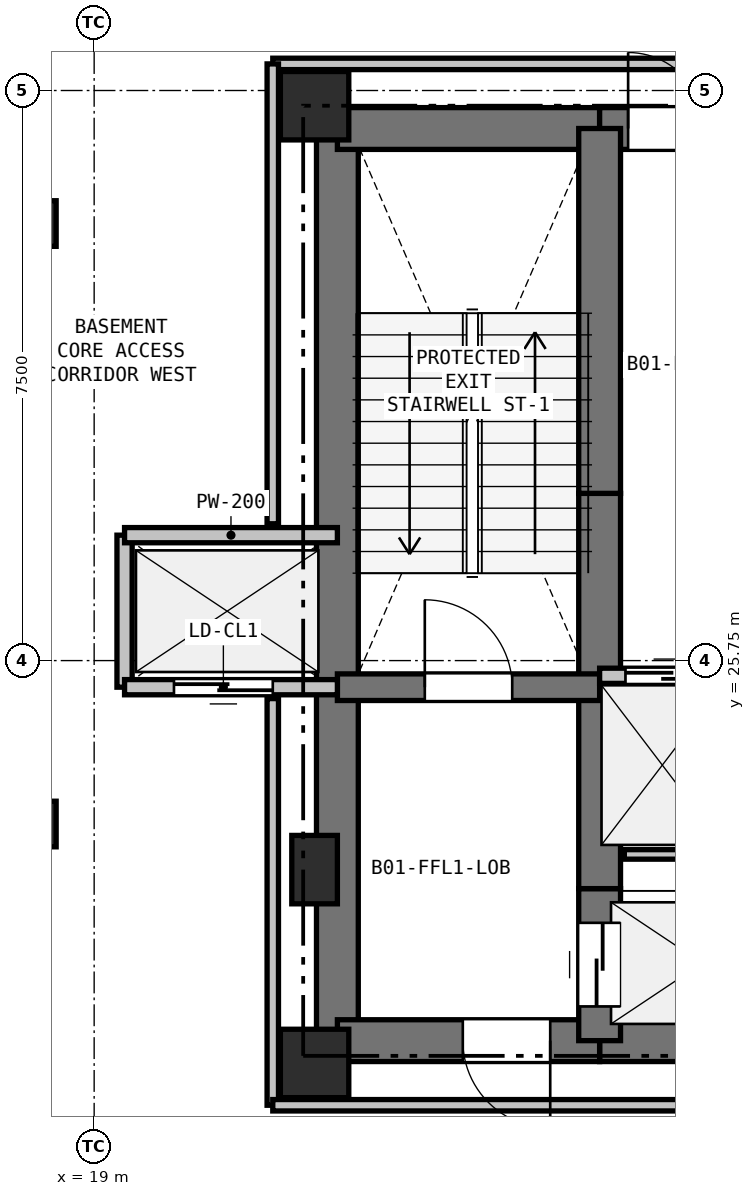
"""IFC4 building model, lengths in metres.
Left out: names, types, materials, properties, quantities, classifications, styles, units other than length and angle.
Written with IfcOpenShell. Run it as: python <this file> out.ifc"""

import sys

from ifc_helpers import new_model, si_unit, direction, frame, frame_2d, origin, origin_2d, place, context, subcontext, project, spatial, rectangle, extrude, element, fill, save


model = new_model("IFC4")
c1 = context("Model", 3, precision=1e-05, world=origin(), true_north=direction((0.0, 1.0)))
c2 = subcontext(c1, "Body", "Model", "MODEL_VIEW")
j1 = project(units=[si_unit("LENGTHUNIT", "METRE"), si_unit("PLANEANGLEUNIT", "RADIAN")], contexts=[c1])
p1 = place(None, origin())
s1 = spatial("IfcSite", under=j1, at=p1, CompositionType="ELEMENT")
p2 = place(p1, origin())
s2 = spatial("IfcBuilding", under=s1, at=p2, CompositionType="ELEMENT")
p3 = place(p2, frame((0.0, 0.0, -4.5)))
s3 = spatial("IfcBuildingStorey", under=s2, at=p3, CompositionType="ELEMENT", Elevation=-4.5)
for number, where, z_axis, x_axis in (
    (1, (18.2, 23.6, 0.0), (0.0, 0.0, 1.0), (1.0, 0.0, 0.0)),
    (2, (18.2, 31.5, 0.0), (0.0, 0.0, 1.0), (1.0, 0.0, 0.0)),
):
    element("IfcColumn", number, at=place(p3, frame(where, z_axis=z_axis, x_axis=x_axis)), inside=s3, PredefinedType="COLUMN", context=c2, shape_type="SweptSolid", body=[
        extrude(rectangle(XDim=0.6, YDim=0.6, at=origin_2d()), origin(), (0.0, 0.0, 1.0), 4.5),
    ])
for number, where, z_axis, x_axis in (
    (3, (21.9, 20.45, 0.0), (0.0, 0.0, 1.0), (1.0, 0.0, 0.0)),
    (4, (21.9, 33.05, 0.0), (0.0, 0.0, 1.0), (1.0, 0.0, 0.0)),
):
    element("IfcColumn", number, at=place(p3, frame(where, z_axis=z_axis, x_axis=x_axis)), inside=s3, PredefinedType="COLUMN", context=c2, shape_type="SweptSolid", body=[
        extrude(rectangle(XDim=0.9, YDim=0.9, at=origin_2d()), origin(), (0.0, 0.0, 1.0), 4.5),
    ])
p4 = place(p3, frame((21.9, 23.0, 0.0), z_axis=(0.0, 0.0, 1.0), x_axis=(1.0, 0.0, 0.0)))
e5 = element("IfcColumn", 5, at=p4, inside=s3, PredefinedType="PILASTER", context=c2, shape_type="SweptSolid", body=[
    extrude(rectangle(XDim=0.6, YDim=0.9, at=origin_2d()), origin(), (0.0, 0.0, 1.0), 4.5),
])
p5 = place(p3, frame((22.2, 20.75, 0.0), z_axis=(0.0, 0.0, 1.0), x_axis=(0.0, 1.0, 0.0)))
e6 = element("IfcWall", 6, at=p5, inside=s3, PredefinedType="SHEAR", context=c2, shape_type="SweptSolid", body=[
    extrude(rectangle(XDim=4.65, YDim=0.55, at=frame_2d((2.325, 0.0))), origin(), (0.0, 0.0, 1.0), 4.2),
])
p6 = place(p3, frame((22.2, 25.4, 0.0), z_axis=(0.0, 0.0, 1.0), x_axis=(0.0, 1.0, 0.0)))
e7 = element("IfcWall", 7, at=p6, inside=s3, PredefinedType="SHEAR", context=c2, shape_type="SweptSolid", body=[
    extrude(rectangle(XDim=7.35, YDim=0.55, at=frame_2d((3.675, 0.0))), origin(), (0.0, 0.0, 1.0), 4.2),
])
p7 = place(p3, frame((22.2, 32.75, 0.0), z_axis=(0.0, 0.0, 1.0), x_axis=(1.0, 0.0, 0.0)))
e8 = element("IfcWall", 8, at=p7, inside=s3, PredefinedType="SHEAR", context=c2, shape_type="SweptSolid", body=[
    extrude(rectangle(XDim=3.45, YDim=0.55, at=frame_2d((1.725, 0.0))), origin(), (0.0, 0.0, 1.0), 4.2),
])
p8 = place(p3, frame((25.65, 32.75, 0.0), z_axis=(0.0, 0.0, 1.0), x_axis=(1.0, 0.0, 0.0)))
e9 = element("IfcWall", 9, at=p8, inside=s3, PredefinedType="SHEAR", context=c2, shape_type="SweptSolid", body=[
    extrude(rectangle(XDim=1.75, YDim=0.55, at=frame_2d((0.875, 0.0))), origin(), (0.0, 0.0, 1.0), 4.2),
])
p9 = place(p8, frame((0.375, 0.0, 0.0)))
e10 = element("IfcOpeningElement", 10, at=p9, cuts=e9, PredefinedType="OPENING", context=c2, shape_type="SweptSolid", body=[
    extrude(rectangle(XDim=1.0, YDim=2.15, at=frame_2d((0.5, 1.075))), frame((0.0, 0.285, 0.0), z_axis=(0.0, -1.0, 0.0), x_axis=(1.0, 0.0, 0.0)), (0.0, 0.0, 1.0), 0.57),
])
p10 = place(p3, frame((28.35, 20.75, 0.0), z_axis=(0.0, 0.0, 1.0), x_axis=(-1.0, 0.0, 0.0)))
e11 = element("IfcWall", 11, at=p10, inside=s3, PredefinedType="SHEAR", context=c2, shape_type="SweptSolid", body=[
    extrude(rectangle(XDim=2.7, YDim=0.55, at=frame_2d((1.35, 0.0))), origin(), (0.0, 0.0, 1.0), 4.2),
])
p11 = place(p3, frame((25.65, 20.75, 0.0), z_axis=(0.0, 0.0, 1.0), x_axis=(-1.0, 0.0, 0.0)))
e12 = element("IfcWall", 12, at=p11, inside=s3, PredefinedType="SHEAR", context=c2, shape_type="SweptSolid", body=[
    extrude(rectangle(XDim=3.45, YDim=0.55, at=frame_2d((1.725, 0.0))), origin(), (0.0, 0.0, 1.0), 4.2),
])
p12 = place(p11, frame((0.65, 0.0, 0.0)))
e13 = element("IfcOpeningElement", 13, at=p12, cuts=e12, PredefinedType="OPENING", context=c2, shape_type="SweptSolid", body=[
    extrude(rectangle(XDim=1.15, YDim=2.15, at=frame_2d((0.575, 1.075))), frame((0.0, 0.285, 0.0), z_axis=(0.0, -1.0, 0.0), x_axis=(1.0, 0.0, 0.0)), (0.0, 0.0, 1.0), 0.57),
])
p13 = place(p3, frame((25.65, 20.75, 0.0), z_axis=(0.0, 0.0, 1.0), x_axis=(0.0, 1.0, 0.0)))
e14 = element("IfcWall", 14, at=p13, inside=s3, PredefinedType="SHEAR", context=c2, shape_type="SweptSolid", body=[
    extrude(rectangle(XDim=2.0, YDim=0.55, at=frame_2d((1.0, 0.0))), origin(), (0.0, 0.0, 1.0), 4.2),
])
p14 = place(p13, frame((0.45, 0.0, 0.0)))
e15 = element("IfcOpeningElement", 15, at=p14, cuts=e14, PredefinedType="OPENING", context=c2, shape_type="SweptSolid", body=[
    extrude(rectangle(XDim=1.1, YDim=2.15, at=frame_2d((0.55, 1.075))), frame((0.0, 0.285, 0.0), z_axis=(0.0, -1.0, 0.0), x_axis=(1.0, 0.0, 0.0)), (0.0, 0.0, 1.0), 0.57),
])
p15 = place(p3, frame((25.65, 22.75, 0.0), z_axis=(0.0, 0.0, 1.0), x_axis=(0.0, 1.0, 0.0)))
e16 = element("IfcWall", 16, at=p15, inside=s3, PredefinedType="SHEAR", context=c2, shape_type="SweptSolid", body=[
    extrude(rectangle(XDim=2.8, YDim=0.55, at=frame_2d((1.4, 0.0))), origin(), (0.0, 0.0, 1.0), 4.2),
])
p16 = place(p3, frame((25.65, 25.55, 0.0), z_axis=(0.0, 0.0, 1.0), x_axis=(0.0, 1.0, 0.0)))
e17 = element("IfcWall", 17, at=p16, inside=s3, PredefinedType="SHEAR", context=c2, shape_type="SweptSolid", body=[
    extrude(rectangle(XDim=2.4, YDim=0.55, at=frame_2d((1.2, 0.0))), origin(), (0.0, 0.0, 1.0), 4.2),
])
p17 = place(p3, frame((25.65, 27.95, 0.0), z_axis=(0.0, 0.0, 1.0), x_axis=(0.0, 1.0, 0.0)))
e18 = element("IfcWall", 18, at=p17, inside=s3, PredefinedType="SHEAR", context=c2, shape_type="SweptSolid", body=[
    extrude(rectangle(XDim=4.8, YDim=0.55, at=frame_2d((2.4, 0.0))), origin(), (0.0, 0.0, 1.0), 4.2),
])
p18 = place(p3, frame((22.2, 25.4, 0.0), z_axis=(0.0, 0.0, 1.0), x_axis=(1.0, 0.0, 0.0)))
e19 = element("IfcWall", 19, at=p18, inside=s3, PredefinedType="SHEAR", context=c2, shape_type="SweptSolid", body=[
    extrude(rectangle(XDim=3.45, YDim=0.35, at=frame_2d((1.725, 0.0))), origin(), (0.0, 0.0, 1.0), 4.2),
])
p19 = place(p18, frame((1.15, 0.0, 0.0)))
e20 = element("IfcOpeningElement", 20, at=p19, cuts=e19, PredefinedType="OPENING", context=c2, shape_type="SweptSolid", body=[
    extrude(rectangle(XDim=1.15, YDim=2.15, at=frame_2d((0.575, 1.075))), frame((0.0, 0.185, 0.0), z_axis=(0.0, -1.0, 0.0), x_axis=(1.0, 0.0, 0.0)), (0.0, 0.0, 1.0), 0.37),
])
p20 = place(p3, frame((25.65, 25.55, 0.0), z_axis=(0.0, 0.0, 1.0), x_axis=(1.0, 0.0, 0.0)))
e21 = element("IfcWall", 21, at=p20, inside=s3, PredefinedType="PARTITIONING", context=c2, shape_type="SweptSolid", body=[
    extrude(rectangle(XDim=4.95, YDim=0.2, at=frame_2d((2.475, 0.0))), origin(), (0.0, 0.0, 1.0), 4.2),
])
p21 = place(p20, frame((0.34, 0.0, 0.0)))
e22 = element("IfcOpeningElement", 22, at=p21, cuts=e21, PredefinedType="OPENING", context=c2, shape_type="SweptSolid", body=[
    extrude(rectangle(XDim=1.1, YDim=2.15, at=frame_2d((0.55, 1.075))), frame((0.0, 0.11, 0.0), z_axis=(0.0, -1.0, 0.0), x_axis=(1.0, 0.0, 0.0)), (0.0, 0.0, 1.0), 0.22),
])
p22 = place(p20, frame((1.99, 0.0, 0.0)))
e23 = element("IfcOpeningElement", 23, at=p22, cuts=e21, PredefinedType="OPENING", context=c2, shape_type="SweptSolid", body=[
    extrude(rectangle(XDim=1.1, YDim=2.15, at=frame_2d((0.55, 1.075))), frame((0.0, 0.11, 0.0), z_axis=(0.0, -1.0, 0.0), x_axis=(1.0, 0.0, 0.0)), (0.0, 0.0, 1.0), 0.22),
])
p23 = place(p20, frame((3.64, 0.0, 0.0)))
e24 = element("IfcOpeningElement", 24, at=p23, cuts=e21, PredefinedType="OPENING", context=c2, shape_type="SweptSolid", body=[
    extrude(rectangle(XDim=1.1, YDim=2.15, at=frame_2d((0.55, 1.075))), frame((0.0, 0.11, 0.0), z_axis=(0.0, -1.0, 0.0), x_axis=(1.0, 0.0, 0.0)), (0.0, 0.0, 1.0), 0.22),
])
p24 = place(p3, frame((19.4, 25.4, 0.0), z_axis=(0.0, 0.0, 1.0), x_axis=(0.0, 1.0, 0.0)))
e25 = element("IfcWall", 25, at=p24, inside=s3, PredefinedType="PARTITIONING", context=c2, shape_type="SweptSolid", body=[
    extrude(rectangle(XDim=2.0, YDim=0.2, at=frame_2d((1.0, 0.0))), origin(), (0.0, 0.0, 1.0), 4.2),
])
p25 = place(p3, frame((19.4, 27.4, 0.0), z_axis=(0.0, 0.0, 1.0), x_axis=(1.0, 0.0, 0.0)))
e26 = element("IfcWall", 26, at=p25, inside=s3, PredefinedType="PARTITIONING", context=c2, shape_type="SweptSolid", body=[
    extrude(rectangle(XDim=2.8, YDim=0.2, at=frame_2d((1.4, 0.0))), origin(), (0.0, 0.0, 1.0), 4.2),
])
p26 = place(p3, frame((22.2, 25.4, 0.0), z_axis=(0.0, 0.0, 1.0), x_axis=(-1.0, 0.0, 0.0)))
e27 = element("IfcWall", 27, at=p26, inside=s3, PredefinedType="PARTITIONING", context=c2, shape_type="SweptSolid", body=[
    extrude(rectangle(XDim=2.8, YDim=0.2, at=frame_2d((1.4, 0.0))), origin(), (0.0, 0.0, 1.0), 4.2),
])
p27 = place(p26, frame((0.85, 0.0, 0.0)))
e28 = element("IfcOpeningElement", 28, at=p27, cuts=e27, PredefinedType="OPENING", context=c2, shape_type="SweptSolid", body=[
    extrude(rectangle(XDim=1.3, YDim=2.2, at=frame_2d((0.65, 1.1))), frame((0.0, 0.11, 0.0), z_axis=(0.0, -1.0, 0.0), x_axis=(1.0, 0.0, 0.0)), (0.0, 0.0, 1.0), 0.22),
])
p28 = place(p3, frame((25.975, 23.2, 0.0), z_axis=(0.0, 0.0, 1.0), x_axis=(1.0, 0.0, 0.0)))
e29 = element("IfcWall", 29, at=p28, inside=s3, PredefinedType="PARTITIONING", context=c2, shape_type="SweptSolid", body=[
    extrude(rectangle(XDim=1.325, YDim=0.125, at=frame_2d((0.663, 0.0))), origin(), (0.0, 0.0, 1.0), 4.2),
])
p29 = place(p3, frame((36.65, 33.6, 0.0), z_axis=(0.0, 0.0, 1.0), x_axis=(-1.0, 0.0, 0.0)))
e30 = element("IfcWall", 30, at=p29, inside=s3, PredefinedType="PARTITIONING", context=c2, shape_type="SweptSolid", body=[
    extrude(rectangle(XDim=15.3, YDim=0.15, at=frame_2d((7.65, 0.0))), origin(), (0.0, 0.0, 1.0), 4.2),
])
p30 = place(p3, frame((21.35, 33.6, 0.0), z_axis=(0.0, 0.0, 1.0), x_axis=(0.0, -1.0, 0.0)))
e31 = element("IfcWall", 31, at=p30, inside=s3, PredefinedType="PARTITIONING", context=c2, shape_type="SweptSolid", body=[
    extrude(rectangle(XDim=6.05, YDim=0.15, at=frame_2d((3.025, 0.0))), origin(), (0.0, 0.0, 1.0), 4.2),
])
p31 = place(p3, frame((21.35, 25.25, 0.0), z_axis=(0.0, 0.0, 1.0), x_axis=(0.0, -1.0, 0.0)))
e32 = element("IfcWall", 32, at=p31, inside=s3, PredefinedType="PARTITIONING", context=c2, shape_type="SweptSolid", body=[
    extrude(rectangle(XDim=5.35, YDim=0.15, at=frame_2d((2.675, 0.0))), origin(), (0.0, 0.0, 1.0), 4.2),
])
p32 = place(p3, frame((21.35, 19.9, 0.0), z_axis=(0.0, 0.0, 1.0), x_axis=(1.0, 0.0, 0.0)))
e33 = element("IfcWall", 33, at=p32, inside=s3, PredefinedType="PARTITIONING", context=c2, shape_type="SweptSolid", body=[
    extrude(rectangle(XDim=15.3, YDim=0.15, at=frame_2d((7.65, 0.0))), origin(), (0.0, 0.0, 1.0), 4.2),
])
p33 = place(p21, origin())
e34 = element("IfcDoor", 34, at=p33, inside=s3, OperationType="SLIDING_TO_LEFT", PredefinedType="DOOR", context=c2, shape_type="SweptSolid", body=[
    extrude(rectangle(XDim=1.1, YDim=2.15, at=frame_2d((0.55, 1.075))), frame((0.0, 0.025, 0.0), z_axis=(0.0, -1.0, 0.0), x_axis=(1.0, 0.0, 0.0)), (0.0, 0.0, 1.0), 0.05),
])
fill(e22, e34)
p34 = place(p9, origin())
e35 = element("IfcDoor", 35, at=p34, inside=s3, OperationType="SINGLE_SWING_LEFT", PredefinedType="DOOR", context=c2, shape_type="SweptSolid", body=[
    extrude(rectangle(XDim=1.0, YDim=2.15, at=frame_2d((0.5, 1.075))), frame((0.0, 0.025, 0.0), z_axis=(0.0, -1.0, 0.0), x_axis=(1.0, 0.0, 0.0)), (0.0, 0.0, 1.0), 0.05),
])
fill(e10, e35)
p35 = place(p14, origin())
e36 = element("IfcDoor", 36, at=p35, inside=s3, OperationType="SLIDING_TO_LEFT", PredefinedType="DOOR", context=c2, shape_type="SweptSolid", body=[
    extrude(rectangle(XDim=1.1, YDim=2.15, at=frame_2d((0.55, 1.075))), frame((0.0, 0.025, 0.0), z_axis=(0.0, -1.0, 0.0), x_axis=(1.0, 0.0, 0.0)), (0.0, 0.0, 1.0), 0.05),
])
fill(e15, e36)
p36 = place(p27, origin())
e37 = element("IfcDoor", 37, at=p36, inside=s3, OperationType="SLIDING_TO_LEFT", PredefinedType="DOOR", context=c2, shape_type="SweptSolid", body=[
    extrude(rectangle(XDim=1.3, YDim=2.2, at=frame_2d((0.65, 1.1))), frame((0.0, 0.025, 0.0), z_axis=(0.0, -1.0, 0.0), x_axis=(1.0, 0.0, 0.0)), (0.0, 0.0, 1.0), 0.05),
])
fill(e28, e37)
p37 = place(p19, origin())
e38 = element("IfcDoor", 38, at=p37, inside=s3, OperationType="SINGLE_SWING_LEFT", PredefinedType="DOOR", context=c2, shape_type="SweptSolid", body=[
    extrude(rectangle(XDim=1.15, YDim=2.15, at=frame_2d((0.575, 1.075))), frame((0.0, 0.025, 0.0), z_axis=(0.0, -1.0, 0.0), x_axis=(1.0, 0.0, 0.0)), (0.0, 0.0, 1.0), 0.05),
])
fill(e20, e38)
p38 = place(p12, origin())
e39 = element("IfcDoor", 39, at=p38, inside=s3, OperationType="SINGLE_SWING_LEFT", PredefinedType="DOOR", context=c2, shape_type="SweptSolid", body=[
    extrude(rectangle(XDim=1.15, YDim=2.15, at=frame_2d((0.575, 1.075))), frame((0.0, 0.025, 0.0), z_axis=(0.0, -1.0, 0.0), x_axis=(1.0, 0.0, 0.0)), (0.0, 0.0, 1.0), 0.05),
])
fill(e13, e39)
save(model, sys.argv[1])
